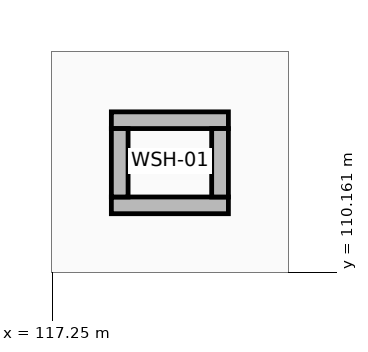
"""IFC4 building model, lengths in metres.
Left out: names, types, materials, properties, quantities, classifications, styles, units other than length and angle.
Written with IfcOpenShell. Run it as: python <this file> out.ifc"""

import sys

from ifc_helpers import new_model, si_unit, direction, frame, frame_2d, origin, place, context, subcontext, project, spatial, rectangle, extrude, element, save


model = new_model("IFC4")
c1 = context("Model", 3, precision=1e-05, world=origin(), true_north=direction((0.0, 1.0)))
c2 = subcontext(c1, "Body", "Model", "MODEL_VIEW")
j1 = project(units=[si_unit("LENGTHUNIT", "METRE"), si_unit("PLANEANGLEUNIT", "RADIAN")], contexts=[c1])
p1 = place(None, origin())
s1 = spatial("IfcSite", under=j1, at=p1, CompositionType="ELEMENT")
p2 = place(p1, origin())
s2 = spatial("IfcBuilding", under=s1, at=p2, CompositionType="ELEMENT")
p3 = place(p2, frame((0.0, 0.0, 31.2)))
s3 = spatial("IfcBuildingStorey", under=s2, at=p3, CompositionType="ELEMENT", Elevation=31.2)
for number, where, z_axis, x_axis in (
    (1, (118.03, 111.04, 0.0), (0.0, 0.0, 1.0), (1.0, 0.0, 0.0)),
    (2, (118.03, 112.16, 0.0), (0.0, 0.0, 1.0), (1.0, 0.0, 0.0)),
):
    element("IfcWall", number, at=place(p3, frame(where, z_axis=z_axis, x_axis=x_axis)), inside=s3, PredefinedType="STANDARD", context=c2, shape_type="SweptSolid", body=[
        extrude(rectangle(XDim=1.54, YDim=0.22, at=frame_2d((0.77, 0.0))), origin(), (0.0, 0.0, 1.0), 2.96),
    ])
for number, where, z_axis, x_axis in (
    (3, (118.14, 111.15, 0.0), (0.0, 0.0, 1.0), (0.0, 1.0, 0.0)),
    (4, (119.46, 111.15, 0.0), (0.0, 0.0, 1.0), (0.0, 1.0, 0.0)),
):
    element("IfcWall", number, at=place(p3, frame(where, z_axis=z_axis, x_axis=x_axis)), inside=s3, PredefinedType="STANDARD", context=c2, shape_type="SweptSolid", body=[
        extrude(rectangle(XDim=0.9, YDim=0.22, at=frame_2d((0.45, 0.0))), origin(), (0.0, 0.0, 1.0), 2.96),
    ])
save(model, sys.argv[1])
